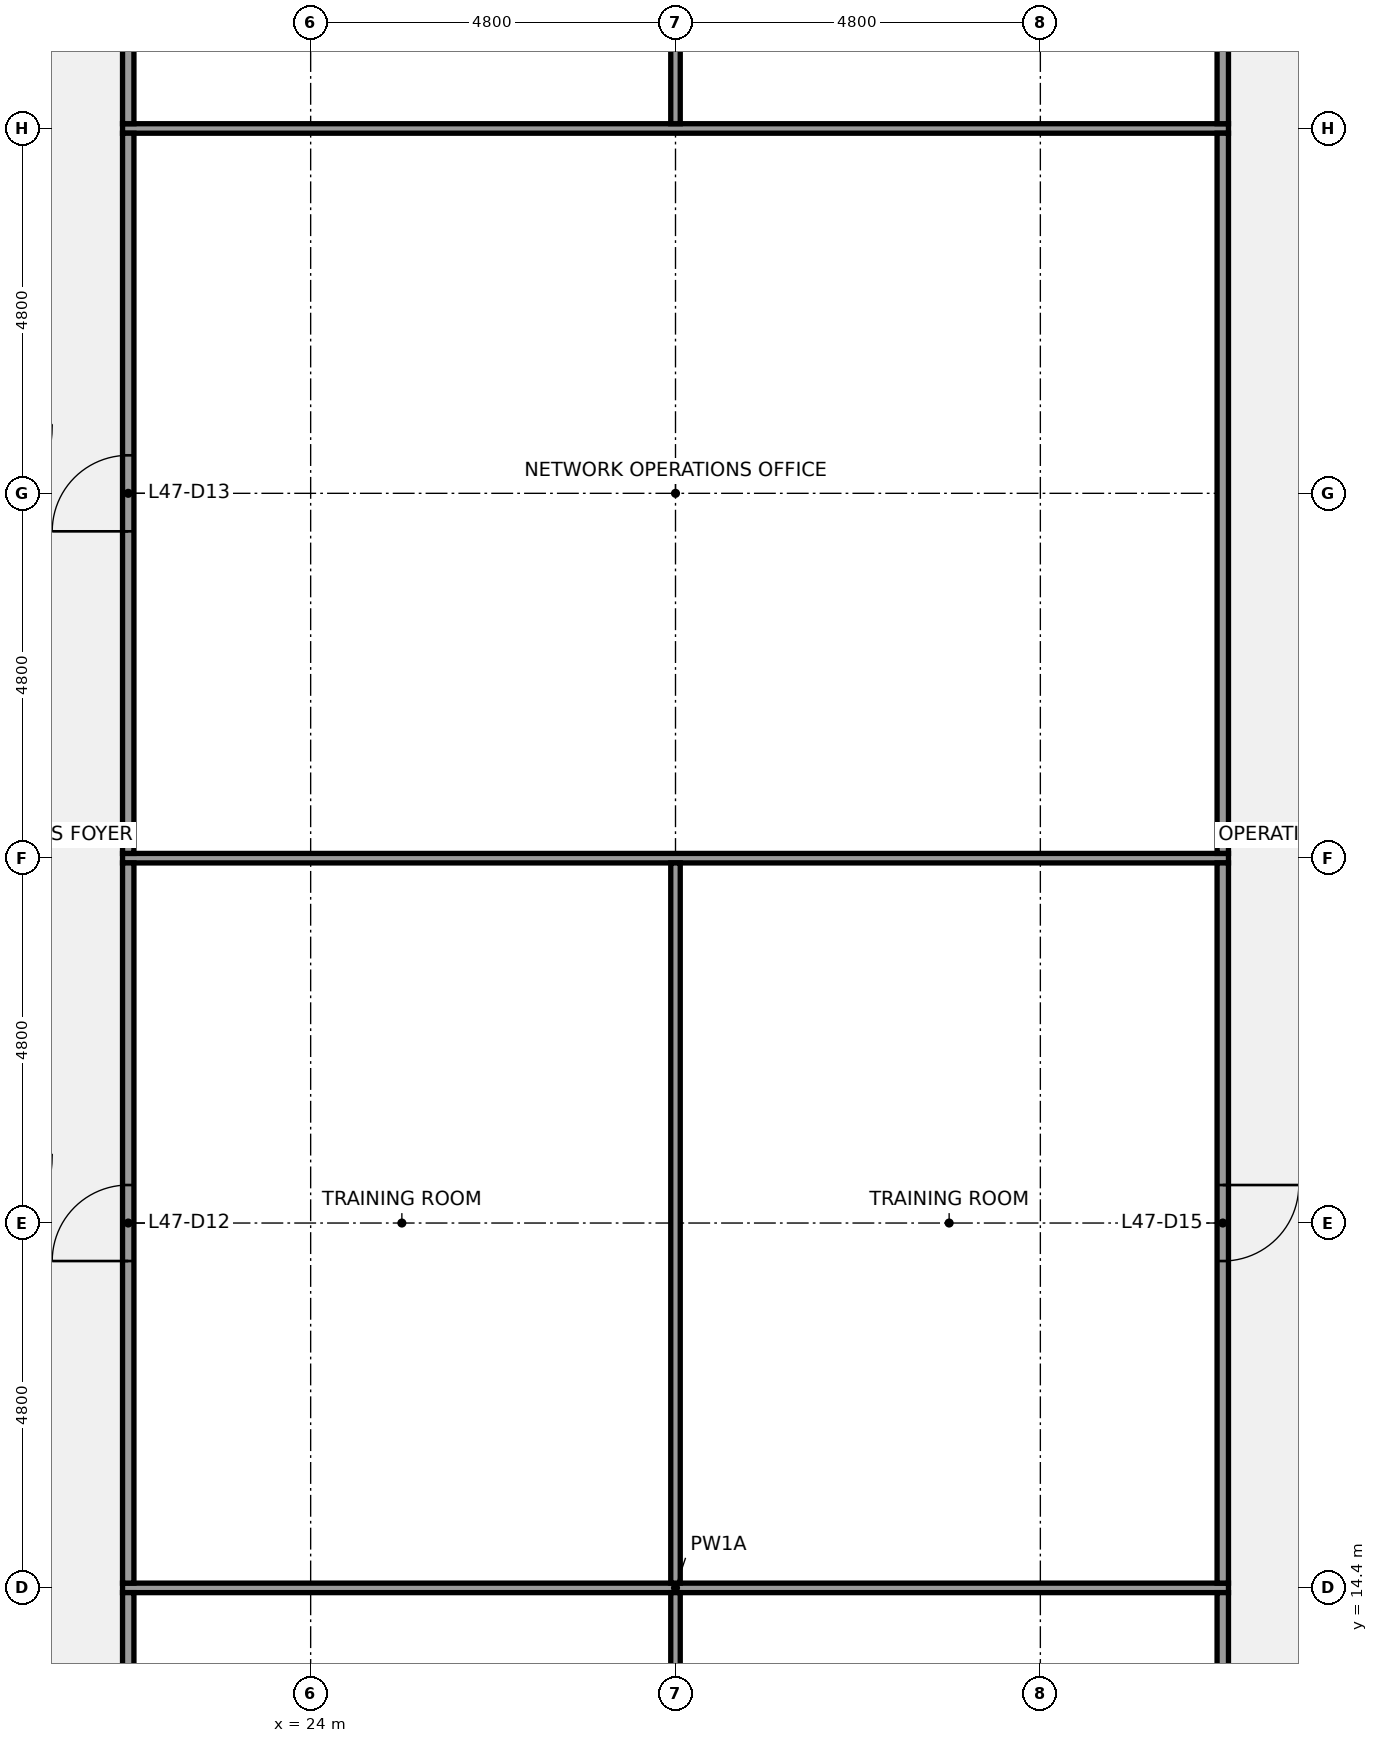
"""IFC4 building model, lengths in metres.
Left out: names, types, materials, properties, quantities, classifications, styles, units other than length and angle.
Written with IfcOpenShell. Run it as: python <this file> out.ifc"""

import sys

from ifc_helpers import new_model, si_unit, direction, frame, frame_2d, origin, place, context, subcontext, project, spatial, rectangle, extrude, element, fill, save


model = new_model("IFC4")
c1 = context("Model", 3, precision=1e-05, world=origin(), true_north=direction((0.0, 1.0)))
c2 = subcontext(c1, "Body", "Model", "MODEL_VIEW")
j1 = project(units=[si_unit("LENGTHUNIT", "METRE"), si_unit("PLANEANGLEUNIT", "RADIAN")], contexts=[c1])
p1 = place(None, origin())
s1 = spatial("IfcSite", under=j1, at=p1, CompositionType="ELEMENT")
p2 = place(p1, origin())
s2 = spatial("IfcBuilding", under=s1, at=p2, CompositionType="ELEMENT")
p3 = place(p2, frame((0.0, 0.0, 217.2)))
s3 = spatial("IfcBuildingStorey", under=s2, at=p3, CompositionType="ELEMENT", Elevation=217.2)
for number, where, z_axis, x_axis in (
    (1, (21.525, 14.4, 0.0), (0.0, 0.0, 1.0), (1.0, 0.0, 0.0)),
    (2, (21.525, 24.0, 0.0), (0.0, 0.0, 1.0), (1.0, 0.0, 0.0)),
    (3, (21.525, 33.6, 0.0), (0.0, 0.0, 1.0), (1.0, 0.0, 0.0)),
):
    element("IfcWall", number, at=place(p3, frame(where, z_axis=z_axis, x_axis=x_axis)), inside=s3, PredefinedType="PARTITIONING", context=c2, shape_type="SweptSolid", body=[
        extrude(rectangle(XDim=14.55, YDim=0.125, at=frame_2d((7.275, 0.0))), origin(), (0.0, 0.0, 1.0), 2.849),
    ])
p4 = place(p3, frame((21.6, 7.275, 0.0), z_axis=(0.0, 0.0, 1.0), x_axis=(0.0, 1.0, 0.0)))
e4 = element("IfcWall", 4, at=p4, inside=s3, PredefinedType="PARTITIONING", context=c2, shape_type="SweptSolid", body=[
    extrude(rectangle(XDim=7.062, YDim=0.15, at=frame_2d((3.531, 0.0))), origin(), (0.0, 0.0, 1.0), 2.849),
])
p5 = place(p4, frame((3.031, 0.0, 0.0)))
e5 = element("IfcOpeningElement", 5, at=p5, cuts=e4, PredefinedType="OPENING", context=c2, shape_type="SweptSolid", body=[
    extrude(rectangle(XDim=1.0, YDim=2.1, at=frame_2d((0.5, 1.05))), frame((0.0, 0.085, 0.0), z_axis=(0.0, -1.0, 0.0), x_axis=(1.0, 0.0, 0.0)), (0.0, 0.0, 1.0), 0.17),
])
p6 = place(p3, frame((21.6, 14.462, 0.0), z_axis=(0.0, 0.0, 1.0), x_axis=(0.0, 1.0, 0.0)))
e6 = element("IfcWall", 6, at=p6, inside=s3, PredefinedType="PARTITIONING", context=c2, shape_type="SweptSolid", body=[
    extrude(rectangle(XDim=9.475, YDim=0.15, at=frame_2d((4.738, 0.0))), origin(), (0.0, 0.0, 1.0), 2.849),
])
p7 = place(p6, frame((4.238, 0.0, 0.0)))
e7 = element("IfcOpeningElement", 7, at=p7, cuts=e6, PredefinedType="OPENING", context=c2, shape_type="SweptSolid", body=[
    extrude(rectangle(XDim=1.0, YDim=2.1, at=frame_2d((0.5, 1.05))), frame((0.0, 0.085, 0.0), z_axis=(0.0, -1.0, 0.0), x_axis=(1.0, 0.0, 0.0)), (0.0, 0.0, 1.0), 0.17),
])
p8 = place(p3, frame((21.6, 24.062, 0.0), z_axis=(0.0, 0.0, 1.0), x_axis=(0.0, 1.0, 0.0)))
e8 = element("IfcWall", 8, at=p8, inside=s3, PredefinedType="PARTITIONING", context=c2, shape_type="SweptSolid", body=[
    extrude(rectangle(XDim=9.475, YDim=0.15, at=frame_2d((4.738, 0.0))), origin(), (0.0, 0.0, 1.0), 2.849),
])
p9 = place(p8, frame((4.238, 0.0, 0.0)))
e9 = element("IfcOpeningElement", 9, at=p9, cuts=e8, PredefinedType="OPENING", context=c2, shape_type="SweptSolid", body=[
    extrude(rectangle(XDim=1.0, YDim=2.1, at=frame_2d((0.5, 1.05))), frame((0.0, 0.085, 0.0), z_axis=(0.0, -1.0, 0.0), x_axis=(1.0, 0.0, 0.0)), (0.0, 0.0, 1.0), 0.17),
])
p10 = place(p3, frame((21.6, 33.663, 0.0), z_axis=(0.0, 0.0, 1.0), x_axis=(0.0, 1.0, 0.0)))
e10 = element("IfcWall", 10, at=p10, inside=s3, PredefinedType="PARTITIONING", context=c2, shape_type="SweptSolid", body=[
    extrude(rectangle(XDim=7.062, YDim=0.15, at=frame_2d((3.531, 0.0))), origin(), (0.0, 0.0, 1.0), 2.849),
])
p11 = place(p3, frame((28.8, 7.275, 0.0), z_axis=(0.0, 0.0, 1.0), x_axis=(0.0, 1.0, 0.0)))
e11 = element("IfcWall", 11, at=p11, inside=s3, PredefinedType="PARTITIONING", context=c2, shape_type="SweptSolid", body=[
    extrude(rectangle(XDim=7.062, YDim=0.125, at=frame_2d((3.531, 0.0))), origin(), (0.0, 0.0, 1.0), 2.849),
])
p12 = place(p3, frame((28.8, 14.462, 0.0), z_axis=(0.0, 0.0, 1.0), x_axis=(0.0, 1.0, 0.0)))
e12 = element("IfcWall", 12, at=p12, inside=s3, PredefinedType="PARTITIONING", context=c2, shape_type="SweptSolid", body=[
    extrude(rectangle(XDim=9.475, YDim=0.125, at=frame_2d((4.738, 0.0))), origin(), (0.0, 0.0, 1.0), 2.849),
])
p13 = place(p3, frame((28.8, 33.663, 0.0), z_axis=(0.0, 0.0, 1.0), x_axis=(0.0, 1.0, 0.0)))
e13 = element("IfcWall", 13, at=p13, inside=s3, PredefinedType="PARTITIONING", context=c2, shape_type="SweptSolid", body=[
    extrude(rectangle(XDim=7.062, YDim=0.125, at=frame_2d((3.531, 0.0))), origin(), (0.0, 0.0, 1.0), 2.849),
])
p14 = place(p3, frame((36.0, 7.275, 0.0), z_axis=(0.0, 0.0, 1.0), x_axis=(0.0, 1.0, 0.0)))
e14 = element("IfcWall", 14, at=p14, inside=s3, PredefinedType="PARTITIONING", context=c2, shape_type="SweptSolid", body=[
    extrude(rectangle(XDim=7.062, YDim=0.15, at=frame_2d((3.531, 0.0))), origin(), (0.0, 0.0, 1.0), 2.849),
])
p15 = place(p14, frame((3.031, 0.0, 0.0)))
e15 = element("IfcOpeningElement", 15, at=p15, cuts=e14, PredefinedType="OPENING", context=c2, shape_type="SweptSolid", body=[
    extrude(rectangle(XDim=1.0, YDim=2.1, at=frame_2d((0.5, 1.05))), frame((0.0, 0.085, 0.0), z_axis=(0.0, -1.0, 0.0), x_axis=(1.0, 0.0, 0.0)), (0.0, 0.0, 1.0), 0.17),
])
p16 = place(p3, frame((36.0, 14.462, 0.0), z_axis=(0.0, 0.0, 1.0), x_axis=(0.0, 1.0, 0.0)))
e16 = element("IfcWall", 16, at=p16, inside=s3, PredefinedType="PARTITIONING", context=c2, shape_type="SweptSolid", body=[
    extrude(rectangle(XDim=9.475, YDim=0.15, at=frame_2d((4.738, 0.0))), origin(), (0.0, 0.0, 1.0), 2.849),
])
p17 = place(p16, frame((4.238, 0.0, 0.0)))
e17 = element("IfcOpeningElement", 17, at=p17, cuts=e16, PredefinedType="OPENING", context=c2, shape_type="SweptSolid", body=[
    extrude(rectangle(XDim=1.0, YDim=2.1, at=frame_2d((0.5, 1.05))), frame((0.0, 0.085, 0.0), z_axis=(0.0, -1.0, 0.0), x_axis=(1.0, 0.0, 0.0)), (0.0, 0.0, 1.0), 0.17),
])
p18 = place(p3, frame((36.0, 24.062, 0.0), z_axis=(0.0, 0.0, 1.0), x_axis=(0.0, 1.0, 0.0)))
e18 = element("IfcWall", 18, at=p18, inside=s3, PredefinedType="PARTITIONING", context=c2, shape_type="SweptSolid", body=[
    extrude(rectangle(XDim=9.475, YDim=0.15, at=frame_2d((4.738, 0.0))), origin(), (0.0, 0.0, 1.0), 2.849),
])
p19 = place(p3, frame((36.0, 33.663, 0.0), z_axis=(0.0, 0.0, 1.0), x_axis=(0.0, 1.0, 0.0)))
e19 = element("IfcWall", 19, at=p19, inside=s3, PredefinedType="PARTITIONING", context=c2, shape_type="SweptSolid", body=[
    extrude(rectangle(XDim=7.062, YDim=0.15, at=frame_2d((3.531, 0.0))), origin(), (0.0, 0.0, 1.0), 2.849),
])
p20 = place(p7, origin())
e20 = element("IfcDoor", 20, at=p20, inside=s3, OperationType="SINGLE_SWING_LEFT", PredefinedType="DOOR", context=c2, shape_type="SweptSolid", body=[
    extrude(rectangle(XDim=1.0, YDim=2.1, at=frame_2d((0.5, 1.05))), frame((0.0, 0.025, 0.0), z_axis=(0.0, -1.0, 0.0), x_axis=(1.0, 0.0, 0.0)), (0.0, 0.0, 1.0), 0.05),
])
fill(e7, e20)
p21 = place(p9, origin())
e21 = element("IfcDoor", 21, at=p21, inside=s3, OperationType="SINGLE_SWING_LEFT", PredefinedType="DOOR", context=c2, shape_type="SweptSolid", body=[
    extrude(rectangle(XDim=1.0, YDim=2.1, at=frame_2d((0.5, 1.05))), frame((0.0, 0.025, 0.0), z_axis=(0.0, -1.0, 0.0), x_axis=(1.0, 0.0, 0.0)), (0.0, 0.0, 1.0), 0.05),
])
fill(e9, e21)
p22 = place(p17, origin())
e22 = element("IfcDoor", 22, at=p22, inside=s3, OperationType="SINGLE_SWING_RIGHT", PredefinedType="DOOR", context=c2, shape_type="SweptSolid", body=[
    extrude(rectangle(XDim=1.0, YDim=2.1, at=frame_2d((0.5, 1.05))), frame((0.0, 0.025, 0.0), z_axis=(0.0, -1.0, 0.0), x_axis=(1.0, 0.0, 0.0)), (0.0, 0.0, 1.0), 0.05),
])
fill(e17, e22)
save(model, sys.argv[1])
